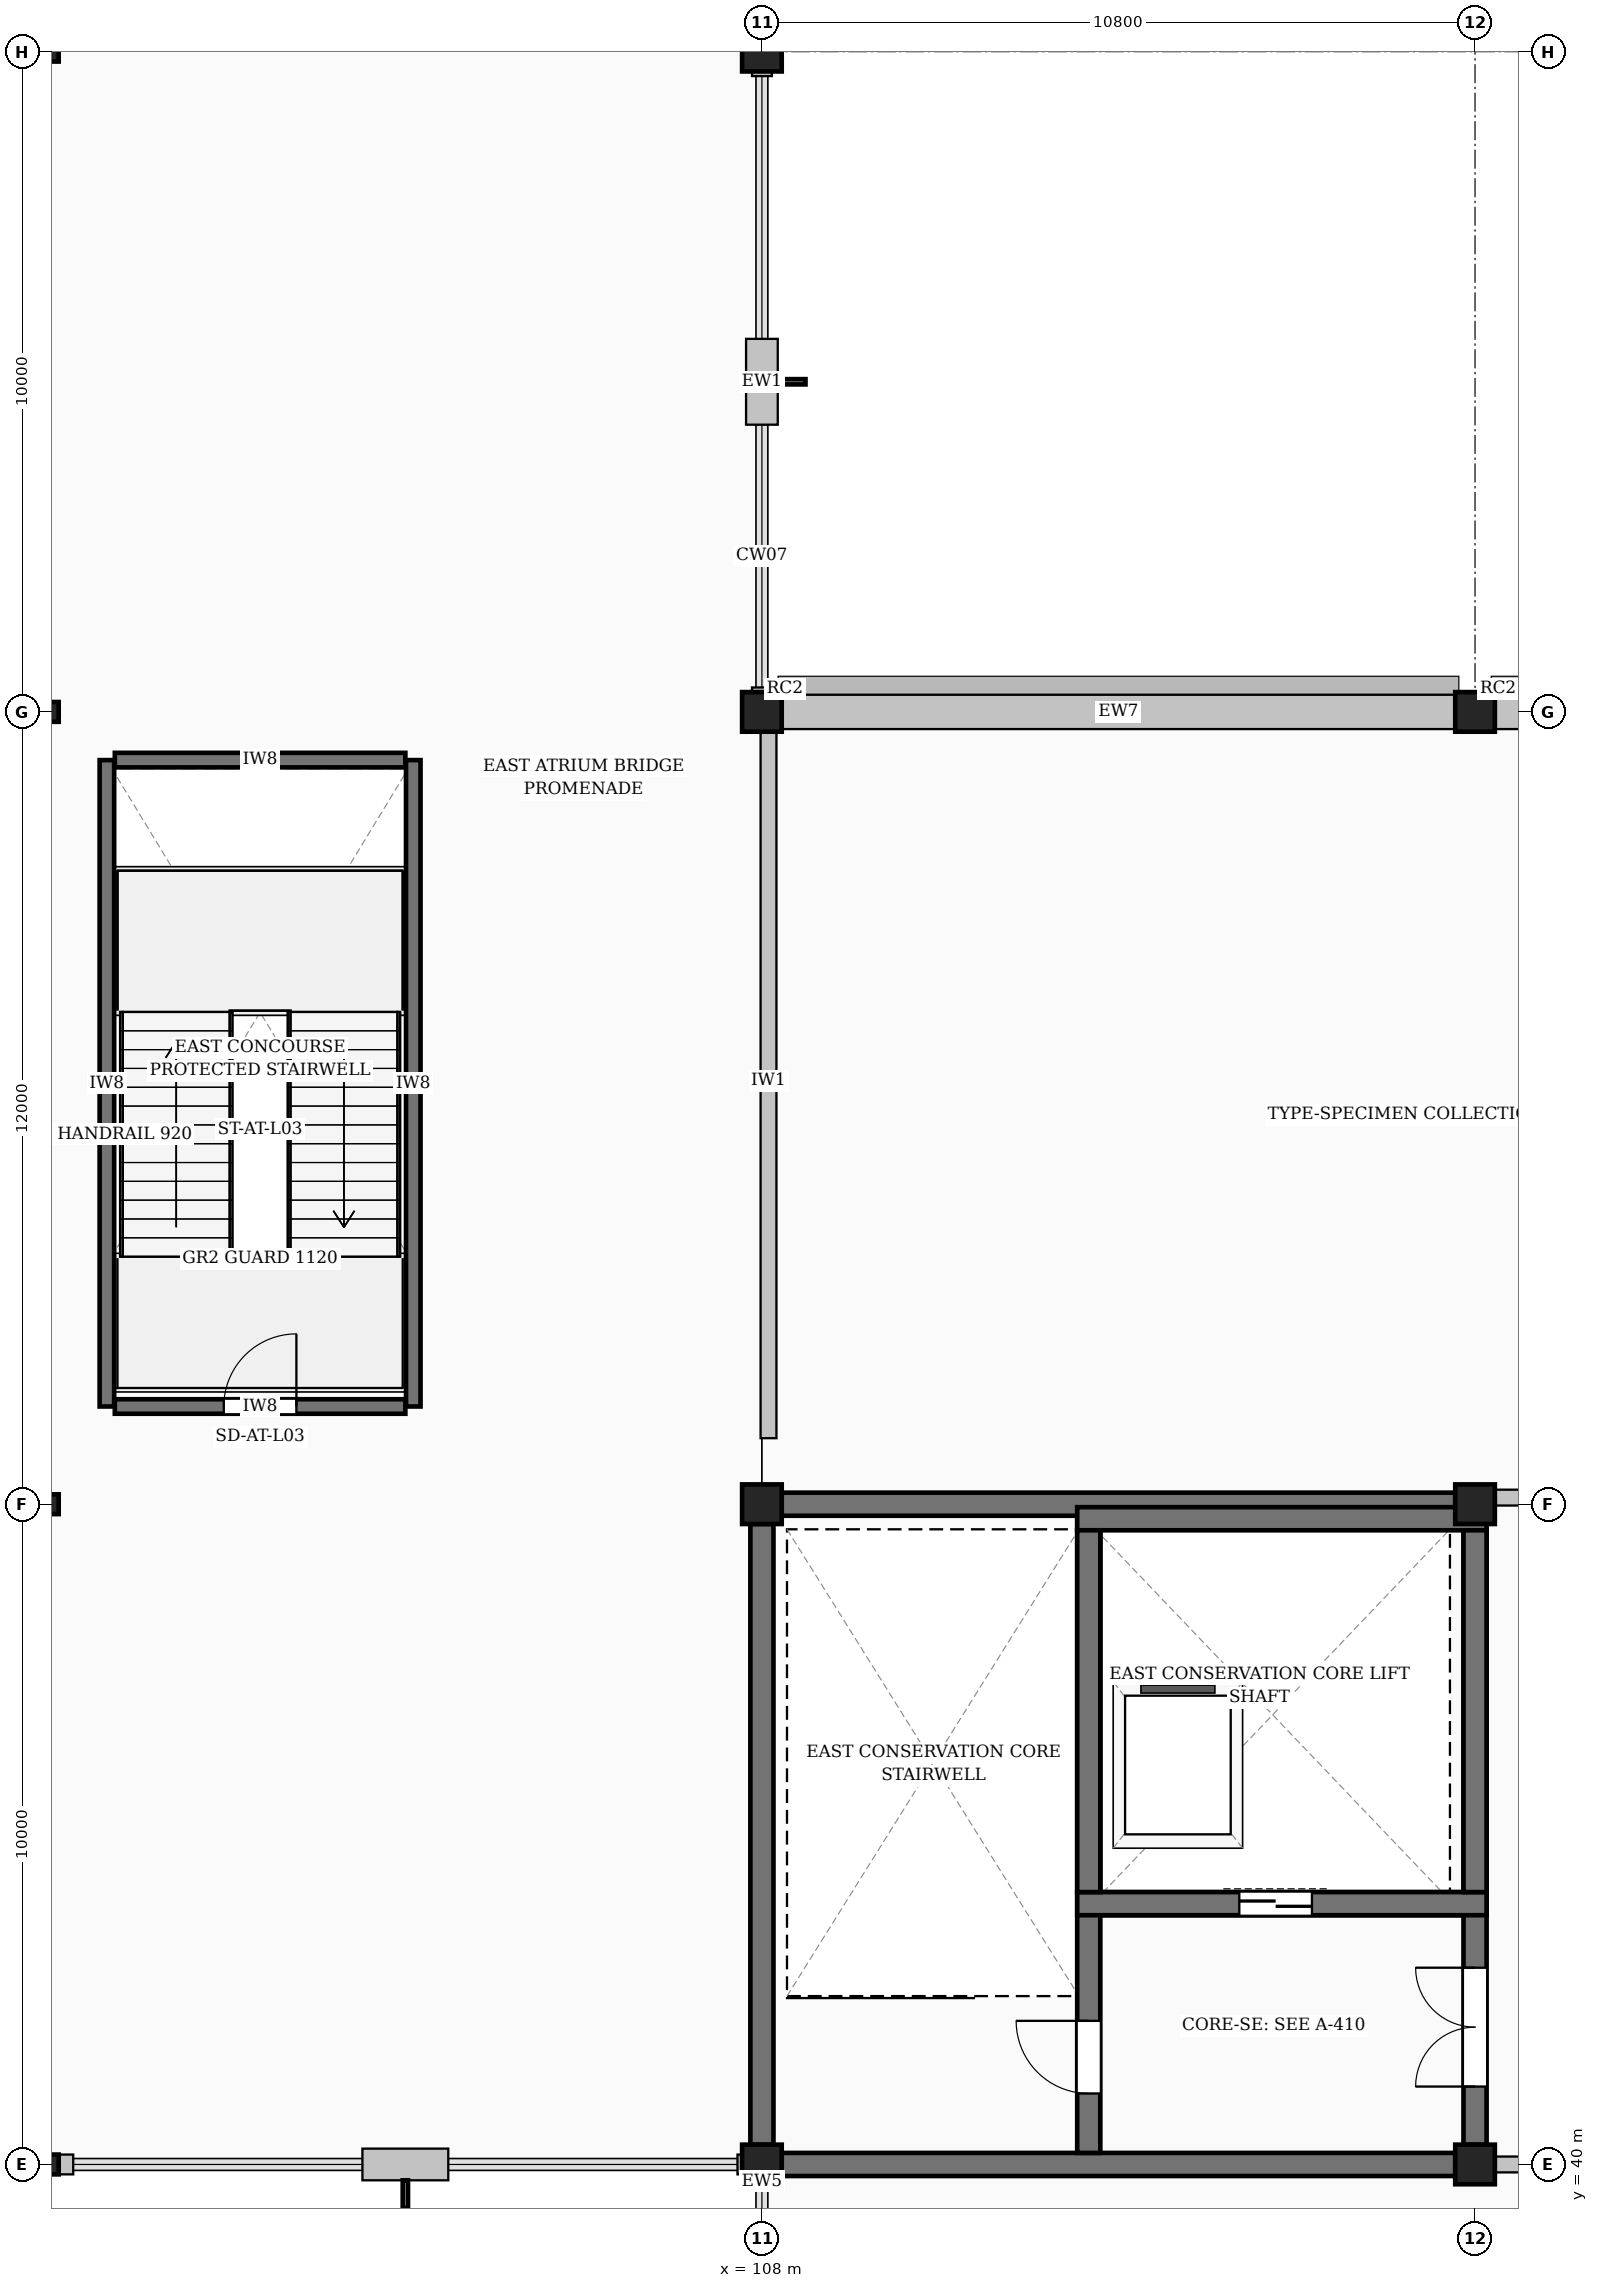
"""IFC4 building model, lengths in metres.
Left out: names, types, materials, properties, quantities, classifications, styles, units other than length and angle.
Written with IfcOpenShell. Run it as: python <this file> out.ifc"""

import sys

from ifc_helpers import new_model, si_unit, direction, frame, frame_2d, origin, origin_2d, place, context, subcontext, project, spatial, rectangle, hollow_rectangle, extrude, element, fill, save


model = new_model("IFC4")
c1 = context("Model", 3, precision=1e-05, world=origin(), true_north=direction((0.0, 1.0)))
c2 = subcontext(c1, "Body", "Model", "MODEL_VIEW")
j1 = project(units=[si_unit("LENGTHUNIT", "METRE"), si_unit("PLANEANGLEUNIT", "RADIAN")], contexts=[c1])
p1 = place(None, origin())
s1 = spatial("IfcSite", under=j1, at=p1, CompositionType="ELEMENT")
p2 = place(p1, origin())
s2 = spatial("IfcBuilding", under=s1, at=p2, CompositionType="ELEMENT")
p3 = place(p2, frame((0.0, 0.0, 14.4)))
s3 = spatial("IfcBuildingStorey", under=s2, at=p3, CompositionType="ELEMENT", Elevation=14.4)
for number, where, z_axis, x_axis in (
    (1, (97.2, 40.0, 0.0), (0.0, 0.0, 1.0), (1.0, 0.0, 0.0)),
    (2, (97.2, 50.0, 0.0), (0.0, 0.0, 1.0), (1.0, 0.0, 0.0)),
    (3, (97.2, 62.0, 0.0), (0.0, 0.0, 1.0), (1.0, 0.0, 0.0)),
    (4, (97.2, 72.0, 0.0), (0.0, 0.0, 1.0), (1.0, 0.0, 0.0)),
):
    element("IfcColumn", number, at=place(p3, frame(where, z_axis=z_axis, x_axis=x_axis)), inside=s3, PredefinedType="COLUMN", context=c2, shape_type="SweptSolid", body=[
        extrude(hollow_rectangle(XDim=0.3, YDim=0.3, WallThickness=0.016, InnerFilletRadius=0.016, OuterFilletRadius=0.032, at=origin_2d()), origin(), (0.0, 0.0, 1.0), 9.6),
    ])
for number, where, z_axis, x_axis in (
    (5, (108.0, 40.0, 0.0), (0.0, 0.0, 1.0), (1.0, 0.0, 0.0)),
    (6, (108.0, 50.0, 0.0), (0.0, 0.0, 1.0), (1.0, 0.0, 0.0)),
    (7, (108.0, 62.0, 0.0), (0.0, 0.0, 1.0), (1.0, 0.0, 0.0)),
    (8, (108.0, 72.0, 0.0), (0.0, 0.0, 1.0), (1.0, 0.0, 0.0)),
    (9, (118.8, 40.0, 0.0), (0.0, 0.0, 1.0), (1.0, 0.0, 0.0)),
    (10, (118.8, 50.0, 0.0), (0.0, 0.0, 1.0), (1.0, 0.0, 0.0)),
    (11, (118.8, 62.0, 0.0), (0.0, 0.0, 1.0), (1.0, 0.0, 0.0)),
):
    element("IfcColumn", number, at=place(p3, frame(where, z_axis=z_axis, x_axis=x_axis)), inside=s3, PredefinedType="COLUMN", context=c2, shape_type="SweptSolid", body=[
        extrude(rectangle(XDim=0.6, YDim=0.6, at=origin_2d()), origin(), (0.0, 0.0, 1.0), 9.6),
    ])
p4 = place(p3, frame((108.0, 39.855, 0.0), z_axis=(0.0, 0.0, 1.0), x_axis=(0.0, -1.0, 0.0)))
e12 = element("IfcWall", 12, at=p4, inside=s3, PredefinedType="STANDARD", context=c2, shape_type="SweptSolid", body=[
    extrude(rectangle(XDim=0.225, YDim=0.3, at=frame_2d((0.113, 0.0))), origin(), (0.0, 0.0, 1.0), 9.36),
])
for number, where, z_axis, x_axis in (
    (13, (129.455, 62.0, 0.0), (0.0, 0.0, 1.0), (-1.0, 0.0, 0.0)),
    (14, (118.655, 62.0, 0.0), (0.0, 0.0, 1.0), (-1.0, 0.0, 0.0)),
):
    element("IfcWall", number, at=place(p3, frame(where, z_axis=z_axis, x_axis=x_axis)), inside=s3, PredefinedType="SOLIDWALL", context=c2, shape_type="SweptSolid", body=[
        extrude(rectangle(XDim=10.51, YDim=0.52, at=frame_2d((5.255, 0.0))), origin(), (0.0, 0.0, 1.0), 8.76),
    ])
p5 = place(p3, frame((108.0, 66.35, 0.0), z_axis=(0.0, 0.0, 1.0), x_axis=(0.0, 1.0, 0.0)))
e15 = element("IfcWall", 15, at=p5, inside=s3, PredefinedType="STANDARD", context=c2, shape_type="SweptSolid", body=[
    extrude(rectangle(XDim=1.3, YDim=0.48, at=frame_2d((0.65, 0.0))), origin(), (0.0, 0.0, 1.0), 9.36),
])
for number, where, z_axis, x_axis in (
    (16, (108.0, 62.145, 0.0), (0.0, 0.0, 1.0), (0.0, 1.0, 0.0)),
    (17, (108.0, 71.63, 0.0), (0.0, 0.0, 1.0), (0.0, 1.0, 0.0)),
):
    element("IfcWall", number, at=place(p3, frame(where, z_axis=z_axis, x_axis=x_axis)), inside=s3, PredefinedType="STANDARD", context=c2, shape_type="SweptSolid", body=[
        extrude(rectangle(XDim=0.225, YDim=0.3, at=frame_2d((0.113, 0.0))), origin(), (0.0, 0.0, 1.0), 9.36),
    ])
p6 = place(p3, frame((101.95, 40.0, 0.0), z_axis=(0.0, 0.0, 1.0), x_axis=(1.0, 0.0, 0.0)))
e18 = element("IfcWall", 18, at=p6, inside=s3, PredefinedType="STANDARD", context=c2, shape_type="SweptSolid", body=[
    extrude(rectangle(XDim=1.3, YDim=0.48, at=frame_2d((0.65, 0.0))), origin(), (0.0, 0.0, 1.0), 8.96),
])
for number, where, z_axis, x_axis in (
    (19, (97.345, 40.0, 0.0), (0.0, 0.0, 1.0), (1.0, 0.0, 0.0)),
    (20, (107.63, 40.0, 0.0), (0.0, 0.0, 1.0), (1.0, 0.0, 0.0)),
):
    element("IfcWall", number, at=place(p3, frame(where, z_axis=z_axis, x_axis=x_axis)), inside=s3, PredefinedType="STANDARD", context=c2, shape_type="SweptSolid", body=[
        extrude(rectangle(XDim=0.225, YDim=0.3, at=frame_2d((0.113, 0.0))), origin(), (0.0, 0.0, 1.0), 9.36),
    ])
for number, where, z_axis, x_axis in (
    (21, (108.3, 40.0, 0.0), (0.0, 0.0, 1.0), (1.0, 0.0, 0.0)),
    (22, (108.3, 50.0, 0.0), (0.0, 0.0, 1.0), (1.0, 0.0, 0.0)),
):
    element("IfcWall", number, at=place(p3, frame(where, z_axis=z_axis, x_axis=x_axis)), inside=s3, PredefinedType="SHEAR", context=c2, shape_type="SweptSolid", body=[
        extrude(rectangle(XDim=10.2, YDim=0.35, at=frame_2d((5.1, 0.0))), origin(), (0.0, 0.0, 1.0), 9.36),
    ])
p7 = place(p3, frame((108.0, 40.3, 0.0), z_axis=(0.0, 0.0, 1.0), x_axis=(0.0, 1.0, 0.0)))
e23 = element("IfcWall", 23, at=p7, inside=s3, PredefinedType="SHEAR", context=c2, shape_type="SweptSolid", body=[
    extrude(rectangle(XDim=9.4, YDim=0.35, at=frame_2d((4.7, 0.0))), origin(), (0.0, 0.0, 1.0), 9.36),
])
p8 = place(p3, frame((118.8, 40.3, 0.0), z_axis=(0.0, 0.0, 1.0), x_axis=(0.0, 1.0, 0.0)))
e24 = element("IfcWall", 24, at=p8, inside=s3, PredefinedType="SHEAR", context=c2, shape_type="SweptSolid", body=[
    extrude(rectangle(XDim=9.4, YDim=0.35, at=frame_2d((4.7, 0.0))), origin(), (0.0, 0.0, 1.0), 9.36),
])
p9 = place(p8, frame((0.88, 0.0, 0.0)))
e25 = element("IfcOpeningElement", 25, at=p9, cuts=e24, PredefinedType="OPENING", context=c2, shape_type="SweptSolid", body=[
    extrude(rectangle(XDim=1.8, YDim=2.25, at=frame_2d((0.9, 1.125))), frame((0.0, 0.185, 0.0), z_axis=(0.0, -1.0, 0.0), x_axis=(1.0, 0.0, 0.0)), (0.0, 0.0, 1.0), 0.37),
])
p10 = place(p3, frame((112.95, 40.175, 0.0), z_axis=(0.0, 0.0, 1.0), x_axis=(0.0, 1.0, 0.0)))
e26 = element("IfcWall", 26, at=p10, inside=s3, PredefinedType="SHEAR", context=c2, shape_type="SweptSolid", body=[
    extrude(rectangle(XDim=9.65, YDim=0.35, at=frame_2d((4.825, 0.0))), origin(), (0.0, 0.0, 1.0), 9.36),
])
p11 = place(p10, frame((0.9, 0.0, 0.0)))
e27 = element("IfcOpeningElement", 27, at=p11, cuts=e26, PredefinedType="OPENING", context=c2, shape_type="SweptSolid", body=[
    extrude(rectangle(XDim=1.1, YDim=2.2, at=frame_2d((0.55, 1.1))), frame((0.0, 0.185, 0.0), z_axis=(0.0, -1.0, 0.0), x_axis=(1.0, 0.0, 0.0)), (0.0, 0.0, 1.0), 0.37),
])
p12 = place(p3, frame((113.13, 43.95, 0.0), z_axis=(0.0, 0.0, 1.0), x_axis=(1.0, 0.0, 0.0)))
e28 = element("IfcWall", 28, at=p12, inside=s3, PredefinedType="SHEAR", context=c2, shape_type="SweptSolid", body=[
    extrude(rectangle(XDim=5.49, YDim=0.35, at=frame_2d((2.745, 0.0))), origin(), (0.0, 0.0, 1.0), 9.36),
])
p13 = place(p12, frame((2.1, 0.0, 0.0)))
e29 = element("IfcOpeningElement", 29, at=p13, cuts=e28, PredefinedType="OPENING", context=c2, shape_type="SweptSolid", body=[
    extrude(rectangle(XDim=1.1, YDim=2.2, at=frame_2d((0.55, 1.1))), frame((0.0, 0.185, 0.0), z_axis=(0.0, -1.0, 0.0), x_axis=(1.0, 0.0, 0.0)), (0.0, 0.0, 1.0), 0.37),
])
for number, where, z_axis, x_axis in (
    (30, (112.775, 43.95, 9.36), (0.0, 0.0, 1.0), (1.0, 0.0, 0.0)),
    (31, (112.775, 49.78, 9.36), (0.0, 0.0, 1.0), (1.0, 0.0, 0.0)),
):
    element("IfcWall", number, at=place(p3, frame(where, z_axis=z_axis, x_axis=x_axis)), inside=s3, PredefinedType="SHEAR", context=c2, shape_type="SweptSolid", body=[
        extrude(rectangle(XDim=6.2, YDim=0.35, at=frame_2d((3.1, 0.0))), origin(), (0.0, 0.0, 1.0), 1.64),
    ])
for number, where, z_axis, x_axis in (
    (32, (112.95, 44.125, 9.36), (0.0, 0.0, 1.0), (0.0, 1.0, 0.0)),
    (33, (118.8, 44.125, 9.36), (0.0, 0.0, 1.0), (0.0, 1.0, 0.0)),
):
    element("IfcWall", number, at=place(p3, frame(where, z_axis=z_axis, x_axis=x_axis)), inside=s3, PredefinedType="SHEAR", context=c2, shape_type="SweptSolid", body=[
        extrude(rectangle(XDim=5.48, YDim=0.35, at=frame_2d((2.74, 0.0))), origin(), (0.0, 0.0, 1.0), 1.64),
    ])
for number, where, z_axis, x_axis in (
    (34, (98.08, 51.48, 0.0), (0.0, 0.0, 1.0), (0.0, 1.0, 0.0)),
    (35, (102.72, 51.48, 0.0), (0.0, 0.0, 1.0), (0.0, 1.0, 0.0)),
):
    element("IfcWall", number, at=place(p3, frame(where, z_axis=z_axis, x_axis=x_axis)), inside=s3, PredefinedType="SHEAR", context=c2, shape_type="SweptSolid", body=[
        extrude(rectangle(XDim=9.79, YDim=0.22, at=frame_2d((4.895, 0.0))), origin(), (0.0, 0.0, 1.0), 9.36),
    ])
p14 = place(p3, frame((98.2, 61.27, 0.0), z_axis=(0.0, 0.0, 1.0), x_axis=(1.0, 0.0, 0.0)))
e36 = element("IfcWall", 36, at=p14, inside=s3, PredefinedType="SHEAR", context=c2, shape_type="SweptSolid", body=[
    extrude(rectangle(XDim=4.4, YDim=0.22, at=frame_2d((2.2, 0.0))), origin(), (0.0, 0.0, 1.0), 9.36),
])
p15 = place(p3, frame((98.2, 51.48, 0.0), z_axis=(0.0, 0.0, 1.0), x_axis=(1.0, 0.0, 0.0)))
e37 = element("IfcWall", 37, at=p15, inside=s3, PredefinedType="SHEAR", context=c2, shape_type="SweptSolid", body=[
    extrude(rectangle(XDim=4.4, YDim=0.22, at=frame_2d((2.2, 0.0))), origin(), (0.0, 0.0, 1.0), 9.36),
])
p16 = place(p15, frame((1.65, 0.0, 0.0)))
e38 = element("IfcOpeningElement", 38, at=p16, cuts=e37, PredefinedType="OPENING", context=c2, shape_type="SweptSolid", body=[
    extrude(rectangle(XDim=1.1, YDim=2.2, at=frame_2d((0.55, 1.1))), frame((0.0, 0.12, 0.0), z_axis=(0.0, -1.0, 0.0), x_axis=(1.0, 0.0, 0.0)), (0.0, 0.0, 1.0), 0.24),
])
p17 = place(p3, frame((118.98, 40.0, 0.0), z_axis=(0.0, 0.0, 1.0), x_axis=(1.0, 0.0, 0.0)))
e39 = element("IfcWall", 39, at=p17, inside=s3, PredefinedType="SOLIDWALL", context=c2, shape_type="SweptSolid", body=[
    extrude(rectangle(XDim=10.44, YDim=0.24, at=frame_2d((5.22, 0.0))), origin(), (0.0, 0.0, 1.0), 8.929),
])
p18 = place(p17, frame((4.145, 0.0, 0.0)))
e40 = element("IfcOpeningElement", 40, at=p18, cuts=e39, PredefinedType="OPENING", context=c2, shape_type="SweptSolid", body=[
    extrude(rectangle(XDim=2.15, YDim=2.6, at=frame_2d((1.075, 1.3))), frame((0.0, 0.13, 0.0), z_axis=(0.0, -1.0, 0.0), x_axis=(1.0, 0.0, 0.0)), (0.0, 0.0, 1.0), 0.26),
])
p19 = place(p3, frame((118.98, 50.1, 0.0), z_axis=(0.0, 0.0, 1.0), x_axis=(1.0, 0.0, 0.0)))
e41 = element("IfcWall", 41, at=p19, inside=s3, PredefinedType="SOLIDWALL", context=c2, shape_type="SweptSolid", body=[
    extrude(rectangle(XDim=10.44, YDim=0.24, at=frame_2d((5.22, 0.0))), origin(), (0.0, 0.0, 1.0), 8.76),
])
p20 = place(p19, frame((4.47, 0.0, 0.0)))
e42 = element("IfcOpeningElement", 42, at=p20, cuts=e41, PredefinedType="OPENING", context=c2, shape_type="SweptSolid", body=[
    extrude(rectangle(XDim=1.5, YDim=2.4, at=frame_2d((0.75, 1.2))), frame((0.0, 0.13, 0.0), z_axis=(0.0, -1.0, 0.0), x_axis=(1.0, 0.0, 0.0)), (0.0, 0.0, 1.0), 0.26),
])
p21 = place(p3, frame((108.1, 51.0, 0.0), z_axis=(0.0, 0.0, 1.0), x_axis=(0.0, 1.0, 0.0)))
e43 = element("IfcWall", 43, at=p21, inside=s3, PredefinedType="SOLIDWALL", context=c2, shape_type="SweptSolid", body=[
    extrude(rectangle(XDim=10.82, YDim=0.24, at=frame_2d((5.41, 0.0))), origin(), (0.0, 0.0, 1.0), 8.749),
])
p22 = place(p11, origin())
e44 = element("IfcDoor", 44, at=p22, inside=s3, OperationType="SINGLE_SWING_RIGHT", PredefinedType="DOOR", context=c2, shape_type="SweptSolid", body=[
    extrude(rectangle(XDim=1.1, YDim=2.2, at=frame_2d((0.55, 1.1))), frame((0.0, 0.025, 0.0), z_axis=(0.0, -1.0, 0.0), x_axis=(1.0, 0.0, 0.0)), (0.0, 0.0, 1.0), 0.05),
])
fill(e27, e44)
p23 = place(p9, origin())
e45 = element("IfcDoor", 45, at=p23, inside=s3, OperationType="DOUBLE_DOOR_SINGLE_SWING", PredefinedType="DOOR", context=c2, shape_type="SweptSolid", body=[
    extrude(rectangle(XDim=1.8, YDim=2.25, at=frame_2d((0.9, 1.125))), frame((0.0, 0.025, 0.0), z_axis=(0.0, -1.0, 0.0), x_axis=(1.0, 0.0, 0.0)), (0.0, 0.0, 1.0), 0.05),
])
fill(e25, e45)
p24 = place(p13, origin())
e46 = element("IfcDoor", 46, at=p24, inside=s3, OperationType="DOUBLE_DOOR_SLIDING", PredefinedType="DOOR", context=c2, shape_type="SweptSolid", body=[
    extrude(rectangle(XDim=1.1, YDim=2.2, at=frame_2d((0.55, 1.1))), frame((0.0, 0.025, 0.0), z_axis=(0.0, -1.0, 0.0), x_axis=(1.0, 0.0, 0.0)), (0.0, 0.0, 1.0), 0.05),
])
fill(e29, e46)
p25 = place(p16, origin())
e47 = element("IfcDoor", 47, at=p25, inside=s3, OperationType="SINGLE_SWING_RIGHT", PredefinedType="DOOR", context=c2, shape_type="SweptSolid", body=[
    extrude(rectangle(XDim=1.1, YDim=2.2, at=frame_2d((0.55, 1.1))), frame((0.0, 0.025, 0.0), z_axis=(0.0, -1.0, 0.0), x_axis=(1.0, 0.0, 0.0)), (0.0, 0.0, 1.0), 0.05),
])
fill(e38, e47)
save(model, sys.argv[1])
